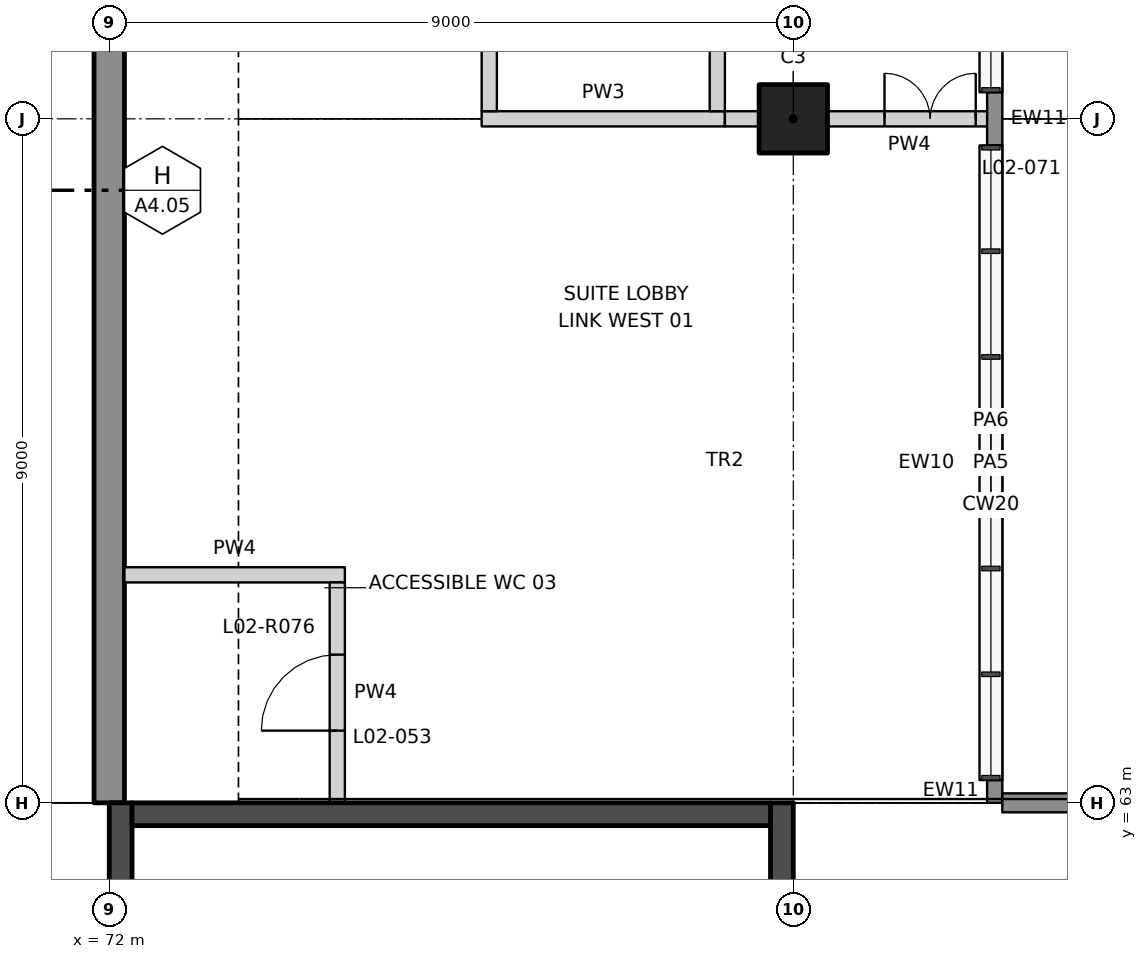
"""IFC4 building model, lengths in metres.
Left out: names, types, materials, properties, quantities, classifications, styles, units other than length and angle.
Written with IfcOpenShell. Run it as: python <this file> out.ifc"""

import sys

from ifc_helpers import new_model, si_unit, direction, frame, frame_2d, origin, origin_2d, place, context, subcontext, project, spatial, polyline, rectangle, outline, extrude, element, fill, save


model = new_model("IFC4")
c1 = context("Model", 3, precision=1e-05, world=origin(), true_north=direction((0.0, 1.0)))
c2 = subcontext(c1, "Body", "Model", "MODEL_VIEW")
j1 = project(units=[si_unit("LENGTHUNIT", "METRE"), si_unit("PLANEANGLEUNIT", "RADIAN")], contexts=[c1])
p1 = place(None, origin())
s1 = spatial("IfcSite", under=j1, at=p1, CompositionType="ELEMENT")
p2 = place(p1, origin())
s2 = spatial("IfcBuilding", under=s1, at=p2, CompositionType="ELEMENT")
p3 = place(p2, frame((0.0, 0.0, 11.5)))
s3 = spatial("IfcBuildingStorey", under=s2, at=p3, CompositionType="ELEMENT", Elevation=11.5)
p4 = place(p3, frame((81.0, 72.0, 0.0), z_axis=(0.0, 0.0, 1.0), x_axis=(1.0, 0.0, 0.0)))
e1 = element("IfcColumn", 1, at=p4, inside=s3, PredefinedType="COLUMN", context=c2, shape_type="SweptSolid", body=[
    extrude(rectangle(XDim=0.9, YDim=0.9, at=origin_2d()), origin(), (0.0, 0.0, 1.0), 4.506),
])
p5 = place(p3, frame((72.0, 99.0, 0.0), z_axis=(0.0, 0.0, 1.0), x_axis=(0.0, -1.0, 0.0)))
e2 = element("IfcWall", 2, at=p5, inside=s3, PredefinedType="SOLIDWALL", context=c2, shape_type="SweptSolid", body=[
    extrude(rectangle(XDim=36.0, YDim=0.4, at=frame_2d((18.0, 0.0))), origin(), (0.0, 0.0, 1.0), 10.5),
])
p6 = place(p3, frame((72.2, 66.0, 0.0), z_axis=(0.0, 0.0, 1.0), x_axis=(1.0, 0.0, 0.0)))
e3 = element("IfcWall", 3, at=p6, inside=s3, PredefinedType="PARTITIONING", context=c2, shape_type="SweptSolid", body=[
    extrude(outline(polyline([(0.0, 0.0), (2.9, 0.0), (2.9, 9.445), (1.933, 10.049), (1.45, 10.5), (0.0, 10.5), (0.0, 0.0)])), frame((0.0, 0.1, 0.0), z_axis=(0.0, -1.0, 0.0), x_axis=(1.0, 0.0, 0.0)), (0.0, 0.0, 1.0), 0.2),
])
p7 = place(p3, frame((76.9, 72.0, 0.0), z_axis=(0.0, 0.0, 1.0), x_axis=(1.0, 0.0, 0.0)))
e4 = element("IfcWall", 4, at=p7, inside=s3, PredefinedType="PARTITIONING", context=c2, shape_type="SweptSolid", body=[
    extrude(rectangle(XDim=3.2, YDim=0.2, at=frame_2d((1.6, 0.0))), origin(), (0.0, 0.0, 1.0), 4.439),
])
p8 = place(p3, frame((81.45, 72.0, 0.0), z_axis=(0.0, 0.0, 1.0), x_axis=(1.0, 0.0, 0.0)))
e5 = element("IfcWall", 5, at=p8, inside=s3, PredefinedType="PARTITIONING", context=c2, shape_type="SweptSolid", body=[
    extrude(outline(polyline([(0.0, 0.0), (2.15, 0.0), (2.15, 2.833), (2.079, 2.877), (0.0, 2.877), (0.0, 0.0)])), frame((0.0, 0.1, 0.0), z_axis=(0.0, -1.0, 0.0), x_axis=(1.0, 0.0, 0.0)), (0.0, 0.0, 1.0), 0.2),
])
p9 = place(p8, frame((0.75, 0.0, 0.0)))
e6 = element("IfcOpeningElement", 6, at=p9, cuts=e5, PredefinedType="OPENING", context=c2, shape_type="SweptSolid", body=[
    extrude(rectangle(XDim=1.2, YDim=2.1, at=frame_2d((0.6, 1.05))), frame((0.0, 0.11, 0.0), z_axis=(0.0, -1.0, 0.0), x_axis=(1.0, 0.0, 0.0)), (0.0, 0.0, 1.0), 0.22),
])
p10 = place(p3, frame((80.1, 72.0, 0.0), z_axis=(0.0, 0.0, 1.0), x_axis=(1.0, 0.0, 0.0)))
e7 = element("IfcWall", 7, at=p10, inside=s3, PredefinedType="PARTITIONING", context=c2, shape_type="SweptSolid", body=[
    extrude(outline(polyline([(0.0, 0.0), (0.45, 0.0), (0.45, 4.739), (0.0, 5.02), (0.0, 0.0)])), frame((0.0, 0.1, 0.0), z_axis=(0.0, -1.0, 0.0), x_axis=(1.0, 0.0, 0.0)), (0.0, 0.0, 1.0), 0.2),
])
p11 = place(p3, frame((75.0, 63.0, 0.0), z_axis=(0.0, 0.0, 1.0), x_axis=(0.0, 1.0, 0.0)))
e8 = element("IfcWall", 8, at=p11, inside=s3, PredefinedType="PARTITIONING", context=c2, shape_type="SweptSolid", body=[
    extrude(outline(polyline([(0.0, 0.0), (2.9, 0.0), (2.9, 9.508), (0.483, 9.508), (0.0, 10.5), (0.0, 0.0)])), frame((0.0, 0.1, 0.0), z_axis=(0.0, -1.0, 0.0), x_axis=(1.0, 0.0, 0.0)), (0.0, 0.0, 1.0), 0.2),
])
p12 = place(p11, frame((0.95, 0.0, 0.0)))
e9 = element("IfcOpeningElement", 9, at=p12, cuts=e8, PredefinedType="OPENING", context=c2, shape_type="SweptSolid", body=[
    extrude(rectangle(XDim=1.0, YDim=2.1, at=frame_2d((0.5, 1.05))), frame((0.0, 0.11, 0.0), z_axis=(0.0, -1.0, 0.0), x_axis=(1.0, 0.0, 0.0)), (0.0, 0.0, 1.0), 0.22),
])
p13 = place(p3, frame((77.0, 72.1, 0.0), z_axis=(0.0, 0.0, 1.0), x_axis=(0.0, 1.0, 0.0)))
e10 = element("IfcWall", 10, at=p13, inside=s3, PredefinedType="PARTITIONING", context=c2, shape_type="SweptSolid", body=[
    extrude(rectangle(XDim=2.8, YDim=0.2, at=frame_2d((1.4, 0.0))), origin(), (0.0, 0.0, 1.0), 8.258),
])
p14 = place(p3, frame((80.0, 72.1, 0.0), z_axis=(0.0, 0.0, 1.0), x_axis=(0.0, 1.0, 0.0)))
e11 = element("IfcWall", 11, at=p14, inside=s3, PredefinedType="PARTITIONING", context=c2, shape_type="SweptSolid", body=[
    extrude(rectangle(XDim=2.8, YDim=0.2, at=frame_2d((1.4, 0.0))), origin(), (0.0, 0.0, 1.0), 6.383),
])
p15 = place(p3, frame((83.65, 63.3, 0.0), z_axis=(0.0, 0.0, 1.0), x_axis=(0.0, 1.0, 0.0)))
e12 = element("IfcWall", 12, at=p15, inside=s3, PredefinedType="SOLIDWALL", context=c2, shape_type="SweptSolid", body=[
    extrude(rectangle(XDim=8.35, YDim=0.2, at=frame_2d((4.175, 0.0))), origin(), (0.0, 0.0, 1.0), 1.1),
])
p16 = place(p3, frame((83.65, 72.35, 0.0), z_axis=(0.0, 0.0, 1.0), x_axis=(0.0, 1.0, 0.0)))
e13 = element("IfcWall", 13, at=p16, inside=s3, PredefinedType="SOLIDWALL", context=c2, shape_type="SweptSolid", body=[
    extrude(rectangle(XDim=6.85, YDim=0.2, at=frame_2d((3.425, 0.0))), origin(), (0.0, 0.0, 1.0), 1.1),
])
p17 = place(p3, frame((83.65, 63.0, 0.0), z_axis=(0.0, 0.0, 1.0), x_axis=(0.0, 1.0, 0.0)))
e14 = element("IfcWall", 14, at=p17, inside=s3, PredefinedType="SOLIDWALL", context=c2, shape_type="SweptSolid", body=[
    extrude(rectangle(XDim=0.3, YDim=0.2, at=frame_2d((0.15, 0.0))), origin(), (0.0, 0.0, 1.0), 4.034),
])
p18 = place(p3, frame((83.65, 71.65, 0.0), z_axis=(0.0, 0.0, 1.0), x_axis=(0.0, 1.0, 0.0)))
e15 = element("IfcWall", 15, at=p18, inside=s3, PredefinedType="SOLIDWALL", context=c2, shape_type="SweptSolid", body=[
    extrude(rectangle(XDim=0.7, YDim=0.2, at=frame_2d((0.35, 0.0))), origin(), (0.0, 0.0, 1.0), 4.034),
])
p19 = place(p3, frame((80.85, 63.0, 0.0), z_axis=(0.0, 0.0, 1.0), x_axis=(0.0, -1.0, 0.0)))
e16 = element("IfcWall", 16, at=p19, inside=s3, PredefinedType="SHEAR", context=c2, shape_type="SweptSolid", body=[
    extrude(rectangle(XDim=18.0, YDim=0.3, at=frame_2d((9.0, 0.0))), origin(), (0.0, 0.0, 1.0), 10.5),
])
p20 = place(p19, frame((1.5, 0.0, 0.0)))
e17 = element("IfcOpeningElement", 17, at=p20, cuts=e16, PredefinedType="OPENING", context=c2, shape_type="SweptSolid", body=[
    extrude(rectangle(XDim=1.2, YDim=2.1, at=frame_2d((0.6, 1.05))), frame((0.0, 0.16, 0.0), z_axis=(0.0, -1.0, 0.0), x_axis=(1.0, 0.0, 0.0)), (0.0, 0.0, 1.0), 0.32),
])
p21 = place(p3, frame((72.15, 63.0, 0.0), z_axis=(0.0, 0.0, 1.0), x_axis=(0.0, -1.0, 0.0)))
e18 = element("IfcWall", 18, at=p21, inside=s3, PredefinedType="SHEAR", context=c2, shape_type="SweptSolid", body=[
    extrude(rectangle(XDim=18.0, YDim=0.3, at=frame_2d((9.0, 0.0))), origin(), (0.0, 0.0, 1.0), 10.5),
])
p22 = place(p3, frame((80.7, 62.85, 0.0), z_axis=(0.0, 0.0, 1.0), x_axis=(-1.0, 0.0, 0.0)))
e19 = element("IfcWall", 19, at=p22, inside=s3, PredefinedType="SHEAR", context=c2, shape_type="SweptSolid", body=[
    extrude(rectangle(XDim=8.4, YDim=0.3, at=frame_2d((4.2, 0.0))), origin(), (0.0, 0.0, 1.0), 10.5),
])
p23 = place(p3, frame((83.75, 63.0, 0.0), z_axis=(0.0, 0.0, 1.0), x_axis=(1.0, 0.0, 0.0)))
e20 = element("IfcWall", 20, at=p23, inside=s3, PredefinedType="SOLIDWALL", context=c2, shape_type="SweptSolid", body=[
    extrude(rectangle(XDim=2.75, YDim=0.25, at=frame_2d((1.375, 0.0))), origin(), (0.0, 0.0, 1.0), 1.217),
])
p24 = place(p12, origin())
e21 = element("IfcDoor", 21, at=p24, inside=s3, OperationType="SINGLE_SWING_LEFT", PredefinedType="DOOR", context=c2, shape_type="SweptSolid", body=[
    extrude(rectangle(XDim=1.0, YDim=2.1, at=frame_2d((0.5, 1.05))), frame((0.0, 0.025, 0.0), z_axis=(0.0, -1.0, 0.0), x_axis=(1.0, 0.0, 0.0)), (0.0, 0.0, 1.0), 0.05),
])
fill(e9, e21)
p25 = place(p9, origin())
e22 = element("IfcDoor", 22, at=p25, inside=s3, OperationType="DOUBLE_DOOR_DOUBLE_SWING", PredefinedType="DOOR", context=c2, shape_type="SweptSolid", body=[
    extrude(rectangle(XDim=1.2, YDim=2.1, at=frame_2d((0.6, 1.05))), frame((0.0, 0.025, 0.0), z_axis=(0.0, -1.0, 0.0), x_axis=(1.0, 0.0, 0.0)), (0.0, 0.0, 1.0), 0.05),
])
fill(e6, e22)
save(model, sys.argv[1])
